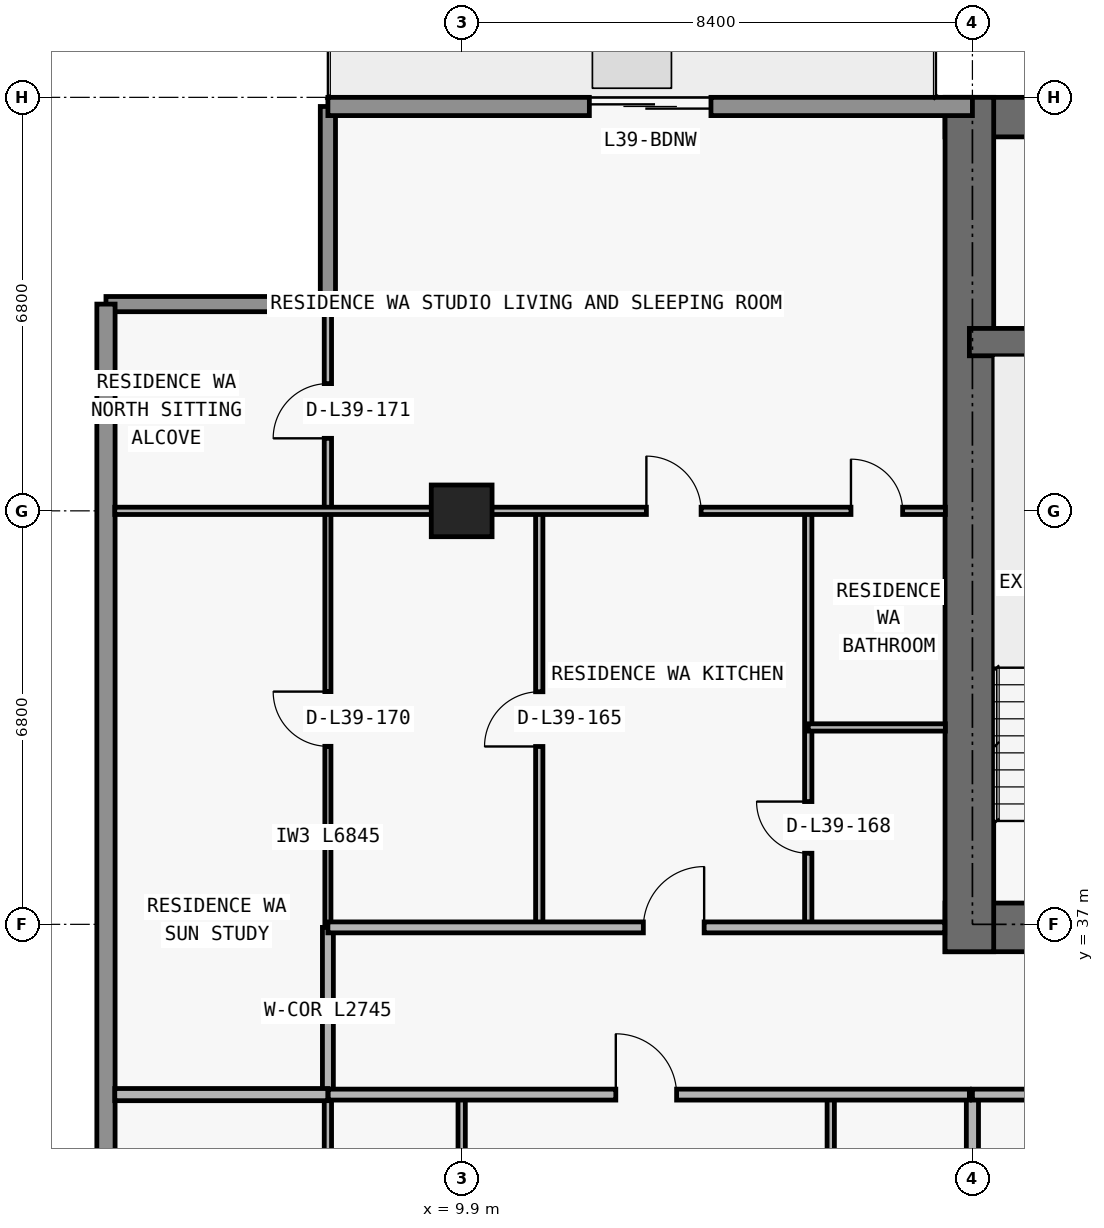
"""IFC4 building model, lengths in metres.
Left out: names, types, materials, properties, quantities, classifications, styles, units other than length and angle.
Written with IfcOpenShell. Run it as: python <this file> out.ifc"""

import sys

from ifc_helpers import new_model, si_unit, direction, frame, frame_2d, origin, origin_2d, place, context, subcontext, project, spatial, rectangle, extrude, element, fill, save


model = new_model("IFC4")
c1 = context("Model", 3, precision=1e-05, world=origin(), true_north=direction((0.0, 1.0)))
c2 = subcontext(c1, "Body", "Model", "MODEL_VIEW")
j1 = project(units=[si_unit("LENGTHUNIT", "METRE"), si_unit("PLANEANGLEUNIT", "RADIAN")], contexts=[c1])
p1 = place(None, origin())
s1 = spatial("IfcSite", under=j1, at=p1, CompositionType="ELEMENT")
p2 = place(p1, origin())
s2 = spatial("IfcBuilding", under=s1, at=p2, CompositionType="ELEMENT")
p3 = place(p2, frame((0.0, 0.0, 142.2)))
s3 = spatial("IfcBuildingStorey", under=s2, at=p3, CompositionType="ELEMENT", Elevation=142.2)
p4 = place(p3, frame((9.9, 43.8, 0.0), z_axis=(0.0, 0.0, 1.0), x_axis=(1.0, 0.0, 0.0)))
e1 = element("IfcColumn", 1, at=p4, inside=s3, PredefinedType="COLUMN", context=c2, shape_type="SweptSolid", body=[
    extrude(rectangle(XDim=1.0, YDim=0.85, at=origin_2d()), origin(), (0.0, 0.0, 1.0), 3.05),
])
p5 = place(p3, frame((17.85, 36.95, 0.0), z_axis=(0.0, 0.0, 1.0), x_axis=(1.0, 0.0, 0.0)))
e2 = element("IfcWall", 2, at=p5, inside=s3, PredefinedType="SHEAR", context=c2, shape_type="SweptSolid", body=[
    extrude(rectangle(XDim=42.1, YDim=0.8, at=frame_2d((21.05, 0.0))), origin(), (0.0, 0.0, 1.0), 3.05),
])
p6 = place(p5, frame((14.45, 0.0, 0.0)))
e3 = element("IfcOpeningElement", 3, at=p6, cuts=e2, PredefinedType="OPENING", context=c2, shape_type="SweptSolid", body=[
    extrude(rectangle(XDim=1.1, YDim=2.15, at=frame_2d((0.55, 1.075))), frame((0.0, 0.41, 0.0), z_axis=(0.0, -1.0, 0.0), x_axis=(1.0, 0.0, 0.0)), (0.0, 0.0, 1.0), 0.82),
])
p7 = place(p5, frame((6.3, 0.0, 0.0)))
e4 = element("IfcOpeningElement", 4, at=p7, cuts=e2, PredefinedType="OPENING", context=c2, shape_type="SweptSolid", body=[
    extrude(rectangle(XDim=1.05, YDim=2.15, at=frame_2d((0.525, 1.075))), frame((0.0, 0.41, 0.0), z_axis=(0.0, -1.0, 0.0), x_axis=(1.0, 0.0, 0.0)), (0.0, 0.0, 1.0), 0.82),
])
p8 = place(p5, frame((34.8, 0.0, 0.0)))
e5 = element("IfcOpeningElement", 5, at=p8, cuts=e2, PredefinedType="OPENING", context=c2, shape_type="SweptSolid", body=[
    extrude(rectangle(XDim=1.05, YDim=2.15, at=frame_2d((0.525, 1.075))), frame((0.0, 0.41, 0.0), z_axis=(0.0, -1.0, 0.0), x_axis=(1.0, 0.0, 0.0)), (0.0, 0.0, 1.0), 0.82),
])
p9 = place(p5, frame((10.913, 0.0, 0.0)))
e6 = element("IfcOpeningElement", 6, at=p9, cuts=e2, PredefinedType="OPENING", context=c2, shape_type="SweptSolid", body=[
    extrude(rectangle(XDim=1.05, YDim=2.15, at=frame_2d((0.525, 1.075))), frame((0.0, 0.41, 0.0), z_axis=(0.0, -1.0, 0.0), x_axis=(1.0, 0.0, 0.0)), (0.0, 0.0, 1.0), 0.82),
])
p10 = place(p5, frame((24.15, 0.0, 0.0)))
e7 = element("IfcOpeningElement", 7, at=p10, cuts=e2, PredefinedType="OPENING", context=c2, shape_type="SweptSolid", body=[
    extrude(rectangle(XDim=1.05, YDim=2.15, at=frame_2d((0.525, 1.075))), frame((0.0, 0.41, 0.0), z_axis=(0.0, -1.0, 0.0), x_axis=(1.0, 0.0, 0.0)), (0.0, 0.0, 1.0), 0.82),
])
p11 = place(p3, frame((17.85, 50.275, 0.0), z_axis=(0.0, 0.0, 1.0), x_axis=(1.0, 0.0, 0.0)))
e8 = element("IfcWall", 8, at=p11, inside=s3, PredefinedType="SHEAR", context=c2, shape_type="SweptSolid", body=[
    extrude(rectangle(XDim=42.1, YDim=0.65, at=frame_2d((21.05, 0.0))), origin(), (0.0, 0.0, 1.0), 3.05),
])
p12 = place(p3, frame((18.25, 36.55, 0.0), z_axis=(0.0, 0.0, 1.0), x_axis=(0.0, 1.0, 0.0)))
e9 = element("IfcWall", 9, at=p12, inside=s3, PredefinedType="SHEAR", context=c2, shape_type="SweptSolid", body=[
    extrude(rectangle(XDim=14.05, YDim=0.8, at=frame_2d((7.025, 0.0))), origin(), (0.0, 0.0, 1.0), 3.05),
])
p13 = place(p3, frame((18.25, 46.575, 0.0), z_axis=(0.0, 0.0, 1.0), x_axis=(1.0, 0.0, 0.0)))
e10 = element("IfcWall", 10, at=p13, inside=s3, PredefinedType="SHEAR", context=c2, shape_type="SweptSolid", body=[
    extrude(rectangle(XDim=41.3, YDim=0.45, at=frame_2d((20.65, 0.0))), origin(), (0.0, 0.0, 1.0), 3.05),
])
p14 = place(p13, frame((7.65, 0.0, 0.0)))
e11 = element("IfcOpeningElement", 11, at=p14, cuts=e10, PredefinedType="OPENING", context=c2, shape_type="SweptSolid", body=[
    extrude(rectangle(XDim=1.0, YDim=2.2, at=frame_2d((0.5, 1.1))), frame((0.0, 0.235, 0.0), z_axis=(0.0, -1.0, 0.0), x_axis=(1.0, 0.0, 0.0)), (0.0, 0.0, 1.0), 0.47),
])
p15 = place(p13, frame((32.675, 0.0, 0.0)))
e12 = element("IfcOpeningElement", 12, at=p15, cuts=e10, PredefinedType="OPENING", context=c2, shape_type="SweptSolid", body=[
    extrude(rectangle(XDim=1.05, YDim=2.15, at=frame_2d((0.525, 1.075))), frame((0.0, 0.235, 0.0), z_axis=(0.0, -1.0, 0.0), x_axis=(1.0, 0.0, 0.0)), (0.0, 0.0, 1.0), 0.47),
])
p16 = place(p3, frame((4.05, 47.2, 0.0), z_axis=(0.0, 0.0, 1.0), x_axis=(1.0, 0.0, 0.0)))
e13 = element("IfcWall", 13, at=p16, inside=s3, PredefinedType="ELEMENTEDWALL", context=c2, shape_type="SweptSolid", body=[
    extrude(rectangle(XDim=3.65, YDim=0.25, at=frame_2d((1.825, 0.0))), origin(), (0.0, 0.0, 1.0), 3.05),
])
p17 = place(p3, frame((7.7, 47.2, 0.0), z_axis=(0.0, 0.0, 1.0), x_axis=(0.0, 1.0, 0.0)))
e14 = element("IfcWall", 14, at=p17, inside=s3, PredefinedType="ELEMENTEDWALL", context=c2, shape_type="SweptSolid", body=[
    extrude(rectangle(XDim=3.25, YDim=0.25, at=frame_2d((1.625, 0.0))), origin(), (0.0, 0.0, 1.0), 3.05),
])
p18 = place(p3, frame((4.05, 28.0, 0.0), z_axis=(0.0, 0.0, 1.0), x_axis=(0.0, 1.0, 0.0)))
e15 = element("IfcWall", 15, at=p18, inside=s3, PredefinedType="STANDARD", context=c2, shape_type="SweptSolid", body=[
    extrude(rectangle(XDim=19.2, YDim=0.3, at=frame_2d((9.6, 0.0))), origin(), (0.0, 0.0, 1.0), 3.05),
])
p19 = place(p3, frame((7.7, 50.45, 0.0), z_axis=(0.0, 0.0, 1.0), x_axis=(1.0, 0.0, 0.0)))
e16 = element("IfcWall", 16, at=p19, inside=s3, PredefinedType="STANDARD", context=c2, shape_type="SweptSolid", body=[
    extrude(rectangle(XDim=10.6, YDim=0.3, at=frame_2d((5.3, 0.0))), origin(), (0.0, 0.0, 1.0), 3.05),
])
p20 = place(p19, frame((4.3, 0.0, 0.0)))
e17 = element("IfcOpeningElement", 17, at=p20, cuts=e16, PredefinedType="OPENING", context=c2, shape_type="SweptSolid", body=[
    extrude(rectangle(XDim=2.0, YDim=2.3, at=frame_2d((1.0, 1.15))), frame((0.0, 0.16, 0.0), z_axis=(0.0, -1.0, 0.0), x_axis=(1.0, 0.0, 0.0)), (0.0, 0.0, 1.0), 0.32),
])
p21 = place(p3, frame((7.7, 29.84, 0.0), z_axis=(0.0, 0.0, 1.0), x_axis=(0.0, 1.0, 0.0)))
e18 = element("IfcWall", 18, at=p21, inside=s3, PredefinedType="PARTITIONING", context=c2, shape_type="SweptSolid", body=[
    extrude(rectangle(XDim=4.36, YDim=0.12, at=frame_2d((2.18, 0.0))), origin(), (0.0, 0.0, 1.0), 3.05),
])
p22 = place(p3, frame((7.7, 34.205, 0.0), z_axis=(0.0, 0.0, 1.0), x_axis=(0.0, 1.0, 0.0)))
e19 = element("IfcWall", 19, at=p22, inside=s3, PredefinedType="PARTITIONING", context=c2, shape_type="SweptSolid", body=[
    extrude(rectangle(XDim=2.745, YDim=0.18, at=frame_2d((1.373, 0.0))), origin(), (0.0, 0.0, 1.0), 3.05),
])
p23 = place(p3, frame((7.7, 36.955, 0.0), z_axis=(0.0, 0.0, 1.0), x_axis=(0.0, 1.0, 0.0)))
e20 = element("IfcWall", 20, at=p23, inside=s3, PredefinedType="MOVABLE", context=c2, shape_type="SweptSolid", body=[
    extrude(rectangle(XDim=6.845, YDim=0.1, at=frame_2d((3.422, 0.0))), origin(), (0.0, 0.0, 1.0), 3.05),
])
p24 = place(p23, frame((2.972, 0.0, 0.0)))
e21 = element("IfcOpeningElement", 21, at=p24, cuts=e20, PredefinedType="OPENING", context=c2, shape_type="SweptSolid", body=[
    extrude(rectangle(XDim=0.9, YDim=2.15, at=frame_2d((0.45, 1.075))), frame((0.0, 0.06, 0.0), z_axis=(0.0, -1.0, 0.0), x_axis=(1.0, 0.0, 0.0)), (0.0, 0.0, 1.0), 0.12),
])
p25 = place(p3, frame((7.7, 43.805, 0.0), z_axis=(0.0, 0.0, 1.0), x_axis=(0.0, 1.0, 0.0)))
e22 = element("IfcWall", 22, at=p25, inside=s3, PredefinedType="PARTITIONING", context=c2, shape_type="SweptSolid", body=[
    extrude(rectangle(XDim=3.275, YDim=0.12, at=frame_2d((1.638, 0.0))), origin(), (0.0, 0.0, 1.0), 3.05),
])
p26 = place(p25, frame((1.188, 0.0, 0.0)))
e23 = element("IfcOpeningElement", 23, at=p26, cuts=e22, PredefinedType="OPENING", context=c2, shape_type="SweptSolid", body=[
    extrude(rectangle(XDim=0.9, YDim=2.15, at=frame_2d((0.45, 1.075))), frame((0.0, 0.07, 0.0), z_axis=(0.0, -1.0, 0.0), x_axis=(1.0, 0.0, 0.0)), (0.0, 0.0, 1.0), 0.14),
])
p27 = place(p3, frame((9.9, 29.84, 0.0), z_axis=(0.0, 0.0, 1.0), x_axis=(0.0, 1.0, 0.0)))
e24 = element("IfcWall", 24, at=p27, inside=s3, PredefinedType="PARTITIONING", context=c2, shape_type="SweptSolid", body=[
    extrude(rectangle(XDim=4.36, YDim=0.12, at=frame_2d((2.18, 0.0))), origin(), (0.0, 0.0, 1.0), 2.174),
])
p28 = place(p3, frame((11.176, 36.95, 0.0), z_axis=(0.0, 0.0, 1.0), x_axis=(0.0, 1.0, 0.0)))
e25 = element("IfcWall", 25, at=p28, inside=s3, PredefinedType="PARTITIONING", context=c2, shape_type="SweptSolid", body=[
    extrude(rectangle(XDim=6.85, YDim=0.12, at=frame_2d((3.425, 0.0))), origin(), (0.0, 0.0, 1.0), 3.05),
])
p29 = place(p28, frame((2.975, 0.0, 0.0)))
e26 = element("IfcOpeningElement", 26, at=p29, cuts=e25, PredefinedType="OPENING", context=c2, shape_type="SweptSolid", body=[
    extrude(rectangle(XDim=0.9, YDim=2.15, at=frame_2d((0.45, 1.075))), frame((0.0, 0.07, 0.0), z_axis=(0.0, -1.0, 0.0), x_axis=(1.0, 0.0, 0.0)), (0.0, 0.0, 1.0), 0.14),
])
p30 = place(p3, frame((15.6, 36.95, 0.0), z_axis=(0.0, 0.0, 1.0), x_axis=(0.0, 1.0, 0.0)))
e27 = element("IfcWall", 27, at=p30, inside=s3, PredefinedType="PARTITIONING", context=c2, shape_type="SweptSolid", body=[
    extrude(rectangle(XDim=6.85, YDim=0.12, at=frame_2d((3.425, 0.0))), origin(), (0.0, 0.0, 1.0), 3.05),
])
p31 = place(p30, frame((1.219, 0.0, 0.0)))
e28 = element("IfcOpeningElement", 28, at=p31, cuts=e27, PredefinedType="OPENING", context=c2, shape_type="SweptSolid", body=[
    extrude(rectangle(XDim=0.85, YDim=2.1, at=frame_2d((0.425, 1.05))), frame((0.0, 0.07, 0.0), z_axis=(0.0, -1.0, 0.0), x_axis=(1.0, 0.0, 0.0)), (0.0, 0.0, 1.0), 0.14),
])
p32 = place(p3, frame((15.97, 29.84, 0.0), z_axis=(0.0, 0.0, 1.0), x_axis=(0.0, 1.0, 0.0)))
e29 = element("IfcWall", 29, at=p32, inside=s3, PredefinedType="PARTITIONING", context=c2, shape_type="SweptSolid", body=[
    extrude(rectangle(XDim=4.36, YDim=0.12, at=frame_2d((2.18, 0.0))), origin(), (0.0, 0.0, 1.0), 3.05),
])
p33 = place(p32, frame((1.755, 0.0, 0.0)))
e30 = element("IfcOpeningElement", 30, at=p33, cuts=e29, PredefinedType="OPENING", context=c2, shape_type="SweptSolid", body=[
    extrude(rectangle(XDim=0.85, YDim=2.1, at=frame_2d((0.425, 1.05))), frame((0.0, 0.07, 0.0), z_axis=(0.0, -1.0, 0.0), x_axis=(1.0, 0.0, 0.0)), (0.0, 0.0, 1.0), 0.14),
])
p34 = place(p3, frame((18.3, 29.84, 0.0), z_axis=(0.0, 0.0, 1.0), x_axis=(0.0, 1.0, 0.0)))
e31 = element("IfcWall", 31, at=p34, inside=s3, PredefinedType="PARTITIONING", context=c2, shape_type="SweptSolid", body=[
    extrude(rectangle(XDim=4.36, YDim=0.2, at=frame_2d((2.18, 0.0))), origin(), (0.0, 0.0, 1.0), 2.174),
])
p35 = place(p3, frame((4.195, 34.2, 0.0), z_axis=(0.0, 0.0, 1.0), x_axis=(1.0, 0.0, 0.0)))
e32 = element("IfcWall", 32, at=p35, inside=s3, PredefinedType="PARTITIONING", context=c2, shape_type="SweptSolid", body=[
    extrude(rectangle(XDim=3.505, YDim=0.2, at=frame_2d((1.752, 0.0))), origin(), (0.0, 0.0, 1.0), 3.05),
])
p36 = place(p3, frame((7.705, 34.2, 0.0), z_axis=(0.0, 0.0, 1.0), x_axis=(1.0, 0.0, 0.0)))
e33 = element("IfcWall", 33, at=p36, inside=s3, PredefinedType="PARTITIONING", context=c2, shape_type="SweptSolid", body=[
    extrude(rectangle(XDim=10.545, YDim=0.18, at=frame_2d((5.272, 0.0))), origin(), (0.0, 0.0, 1.0), 3.05),
])
p37 = place(p36, frame((4.73, 0.0, 0.0)))
e34 = element("IfcOpeningElement", 34, at=p37, cuts=e33, PredefinedType="OPENING", context=c2, shape_type="SweptSolid", body=[
    extrude(rectangle(XDim=1.0, YDim=2.2, at=frame_2d((0.5, 1.1))), frame((0.0, 0.1, 0.0), z_axis=(0.0, -1.0, 0.0), x_axis=(1.0, 0.0, 0.0)), (0.0, 0.0, 1.0), 0.2),
])
p38 = place(p3, frame((18.3, 34.2, 0.0), z_axis=(0.0, 0.0, 1.0), x_axis=(1.0, 0.0, 0.0)))
e35 = element("IfcWall", 35, at=p38, inside=s3, PredefinedType="PARTITIONING", context=c2, shape_type="SweptSolid", body=[
    extrude(rectangle(XDim=41.2, YDim=0.18, at=frame_2d((20.6, 0.0))), origin(), (0.0, 0.0, 1.0), 3.05),
])
p39 = place(p38, frame((2.683, 0.0, 0.0)))
e36 = element("IfcOpeningElement", 36, at=p39, cuts=e35, PredefinedType="OPENING", context=c2, shape_type="SweptSolid", body=[
    extrude(rectangle(XDim=1.0, YDim=2.2, at=frame_2d((0.5, 1.1))), frame((0.0, 0.1, 0.0), z_axis=(0.0, -1.0, 0.0), x_axis=(1.0, 0.0, 0.0)), (0.0, 0.0, 1.0), 0.2),
])
p40 = place(p38, frame((10.919, 0.0, 0.0)))
e37 = element("IfcOpeningElement", 37, at=p40, cuts=e35, PredefinedType="OPENING", context=c2, shape_type="SweptSolid", body=[
    extrude(rectangle(XDim=1.0, YDim=2.2, at=frame_2d((0.5, 1.1))), frame((0.0, 0.1, 0.0), z_axis=(0.0, -1.0, 0.0), x_axis=(1.0, 0.0, 0.0)), (0.0, 0.0, 1.0), 0.2),
])
p41 = place(p38, frame((19.192, 0.0, 0.0)))
e38 = element("IfcOpeningElement", 38, at=p41, cuts=e35, PredefinedType="OPENING", context=c2, shape_type="SweptSolid", body=[
    extrude(rectangle(XDim=1.0, YDim=2.2, at=frame_2d((0.5, 1.1))), frame((0.0, 0.1, 0.0), z_axis=(0.0, -1.0, 0.0), x_axis=(1.0, 0.0, 0.0)), (0.0, 0.0, 1.0), 0.2),
])
p42 = place(p38, frame((35.546, 0.0, 0.0)))
e39 = element("IfcOpeningElement", 39, at=p42, cuts=e35, PredefinedType="OPENING", context=c2, shape_type="SweptSolid", body=[
    extrude(rectangle(XDim=1.0, YDim=2.2, at=frame_2d((0.5, 1.1))), frame((0.0, 0.1, 0.0), z_axis=(0.0, -1.0, 0.0), x_axis=(1.0, 0.0, 0.0)), (0.0, 0.0, 1.0), 0.2),
])
p43 = place(p3, frame((7.7, 36.95, 0.0), z_axis=(0.0, 0.0, 1.0), x_axis=(1.0, 0.0, 0.0)))
e40 = element("IfcWall", 40, at=p43, inside=s3, PredefinedType="PARTITIONING", context=c2, shape_type="SweptSolid", body=[
    extrude(rectangle(XDim=10.145, YDim=0.18, at=frame_2d((5.073, 0.0))), origin(), (0.0, 0.0, 1.0), 3.05),
])
p44 = place(p43, frame((5.188, 0.0, 0.0)))
e41 = element("IfcOpeningElement", 41, at=p44, cuts=e40, PredefinedType="OPENING", context=c2, shape_type="SweptSolid", body=[
    extrude(rectangle(XDim=1.0, YDim=2.2, at=frame_2d((0.5, 1.1))), frame((0.0, 0.1, 0.0), z_axis=(0.0, -1.0, 0.0), x_axis=(1.0, 0.0, 0.0)), (0.0, 0.0, 1.0), 0.2),
])
p45 = place(p3, frame((15.6, 40.238, 0.0), z_axis=(0.0, 0.0, 1.0), x_axis=(1.0, 0.0, 0.0)))
e42 = element("IfcWall", 42, at=p45, inside=s3, PredefinedType="PARTITIONING", context=c2, shape_type="SweptSolid", body=[
    extrude(rectangle(XDim=2.255, YDim=0.12, at=frame_2d((1.127, 0.0))), origin(), (0.0, 0.0, 1.0), 3.05),
])
p46 = place(p3, frame((4.195, 43.8, 0.0), z_axis=(0.0, 0.0, 1.0), x_axis=(1.0, 0.0, 0.0)))
e43 = element("IfcWall", 43, at=p46, inside=s3, PredefinedType="PARTITIONING", context=c2, shape_type="SweptSolid", body=[
    extrude(rectangle(XDim=13.66, YDim=0.12, at=frame_2d((6.83, 0.0))), origin(), (0.0, 0.0, 1.0), 2.339),
])
p47 = place(p46, frame((8.743, 0.0, 0.0)))
e44 = element("IfcOpeningElement", 44, at=p47, cuts=e43, PredefinedType="OPENING", context=c2, shape_type="SweptSolid", body=[
    extrude(rectangle(XDim=0.9, YDim=2.15, at=frame_2d((0.45, 1.075))), frame((0.0, 0.07, 0.0), z_axis=(0.0, -1.0, 0.0), x_axis=(1.0, 0.0, 0.0)), (0.0, 0.0, 1.0), 0.14),
])
p48 = place(p46, frame((12.107, 0.0, 0.0)))
e45 = element("IfcOpeningElement", 45, at=p48, cuts=e43, PredefinedType="OPENING", context=c2, shape_type="SweptSolid", body=[
    extrude(rectangle(XDim=0.85, YDim=2.1, at=frame_2d((0.425, 1.05))), frame((0.0, 0.07, 0.0), z_axis=(0.0, -1.0, 0.0), x_axis=(1.0, 0.0, 0.0)), (0.0, 0.0, 1.0), 0.14),
])
p49 = place(p20, origin())
e46 = element("IfcDoor", 46, at=p49, inside=s3, OperationType="DOUBLE_DOOR_SLIDING", PredefinedType="DOOR", context=c2, shape_type="SweptSolid", body=[
    extrude(rectangle(XDim=2.0, YDim=2.3, at=frame_2d((1.0, 1.15))), frame((0.0, 0.025, 0.0), z_axis=(0.0, -1.0, 0.0), x_axis=(1.0, 0.0, 0.0)), (0.0, 0.0, 1.0), 0.05),
])
fill(e17, e46)
p50 = place(p37, origin())
e47 = element("IfcDoor", 47, at=p50, inside=s3, OperationType="SINGLE_SWING_LEFT", PredefinedType="DOOR", context=c2, shape_type="SweptSolid", body=[
    extrude(rectangle(XDim=1.0, YDim=2.2, at=frame_2d((0.5, 1.1))), frame((0.0, 0.025, 0.0), z_axis=(0.0, -1.0, 0.0), x_axis=(1.0, 0.0, 0.0)), (0.0, 0.0, 1.0), 0.05),
])
fill(e34, e47)
p51 = place(p29, origin())
e48 = element("IfcDoor", 48, at=p51, inside=s3, OperationType="SINGLE_SWING_LEFT", PredefinedType="DOOR", context=c2, shape_type="SweptSolid", body=[
    extrude(rectangle(XDim=0.9, YDim=2.15, at=frame_2d((0.45, 1.075))), frame((0.0, 0.025, 0.0), z_axis=(0.0, -1.0, 0.0), x_axis=(1.0, 0.0, 0.0)), (0.0, 0.0, 1.0), 0.05),
])
fill(e26, e48)
p52 = place(p44, origin())
e49 = element("IfcDoor", 49, at=p52, inside=s3, OperationType="SINGLE_SWING_RIGHT", PredefinedType="DOOR", context=c2, shape_type="SweptSolid", body=[
    extrude(rectangle(XDim=1.0, YDim=2.2, at=frame_2d((0.5, 1.1))), frame((0.0, 0.025, 0.0), z_axis=(0.0, -1.0, 0.0), x_axis=(1.0, 0.0, 0.0)), (0.0, 0.0, 1.0), 0.05),
])
fill(e41, e49)
p53 = place(p47, origin())
e50 = element("IfcDoor", 50, at=p53, inside=s3, OperationType="SINGLE_SWING_LEFT", PredefinedType="DOOR", context=c2, shape_type="SweptSolid", body=[
    extrude(rectangle(XDim=0.9, YDim=2.15, at=frame_2d((0.45, 1.075))), frame((0.0, 0.025, 0.0), z_axis=(0.0, -1.0, 0.0), x_axis=(1.0, 0.0, 0.0)), (0.0, 0.0, 1.0), 0.05),
])
fill(e44, e50)
p54 = place(p31, origin())
e51 = element("IfcDoor", 51, at=p54, inside=s3, OperationType="SINGLE_SWING_RIGHT", PredefinedType="DOOR", context=c2, shape_type="SweptSolid", body=[
    extrude(rectangle(XDim=0.85, YDim=2.1, at=frame_2d((0.425, 1.05))), frame((0.0, 0.025, 0.0), z_axis=(0.0, -1.0, 0.0), x_axis=(1.0, 0.0, 0.0)), (0.0, 0.0, 1.0), 0.05),
])
fill(e28, e51)
p55 = place(p48, origin())
e52 = element("IfcDoor", 52, at=p55, inside=s3, OperationType="SINGLE_SWING_LEFT", PredefinedType="DOOR", context=c2, shape_type="SweptSolid", body=[
    extrude(rectangle(XDim=0.85, YDim=2.1, at=frame_2d((0.425, 1.05))), frame((0.0, 0.025, 0.0), z_axis=(0.0, -1.0, 0.0), x_axis=(1.0, 0.0, 0.0)), (0.0, 0.0, 1.0), 0.05),
])
fill(e45, e52)
p56 = place(p24, origin())
e53 = element("IfcDoor", 53, at=p56, inside=s3, OperationType="SINGLE_SWING_RIGHT", PredefinedType="DOOR", context=c2, shape_type="SweptSolid", body=[
    extrude(rectangle(XDim=0.9, YDim=2.15, at=frame_2d((0.45, 1.075))), frame((0.0, 0.025, 0.0), z_axis=(0.0, -1.0, 0.0), x_axis=(1.0, 0.0, 0.0)), (0.0, 0.0, 1.0), 0.05),
])
fill(e21, e53)
p57 = place(p26, origin())
e54 = element("IfcDoor", 54, at=p57, inside=s3, OperationType="SINGLE_SWING_LEFT", PredefinedType="DOOR", context=c2, shape_type="SweptSolid", body=[
    extrude(rectangle(XDim=0.9, YDim=2.15, at=frame_2d((0.45, 1.075))), frame((0.0, 0.025, 0.0), z_axis=(0.0, -1.0, 0.0), x_axis=(1.0, 0.0, 0.0)), (0.0, 0.0, 1.0), 0.05),
])
fill(e23, e54)
save(model, sys.argv[1])
